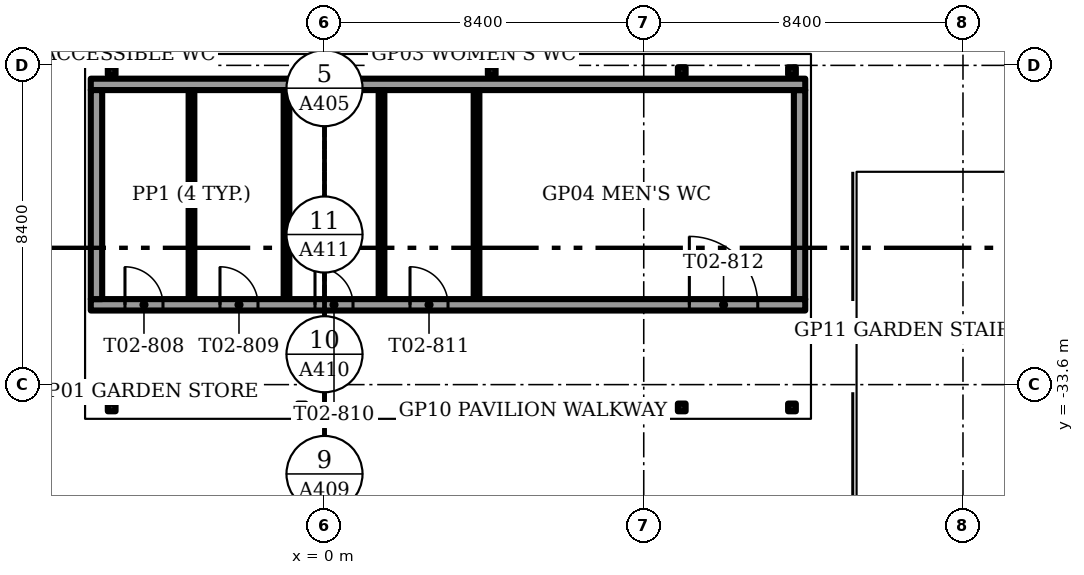
"""IFC4 building model, lengths in metres.
Left out: names, types, materials, properties, quantities, classifications, styles, units other than length and angle.
Written with IfcOpenShell. Run it as: python <this file> out.ifc"""

import sys

from ifc_helpers import new_model, si_unit, direction, frame, frame_2d, origin, origin_2d, place, context, subcontext, project, spatial, rectangle, hollow_rectangle, extrude, element, fill, save


model = new_model("IFC4")
c1 = context("Model", 3, precision=1e-05, world=origin(), true_north=direction((0.0, 1.0)))
c2 = subcontext(c1, "Body", "Model", "MODEL_VIEW")
j1 = project(units=[si_unit("LENGTHUNIT", "METRE"), si_unit("PLANEANGLEUNIT", "RADIAN")], contexts=[c1])
p1 = place(None, origin())
s1 = spatial("IfcSite", under=j1, at=p1, CompositionType="ELEMENT")
p2 = place(p1, origin())
s2 = spatial("IfcBuilding", under=s1, at=p2, CompositionType="ELEMENT")
p3 = place(p2, frame((0.0, 0.0, 10.0)))
s3 = spatial("IfcBuildingStorey", under=s2, at=p3, CompositionType="ELEMENT", Elevation=10.0)
for number, where, z_axis, x_axis in (
    (1, (-5.6, -34.2, 0.3), (0.0, 0.0, 1.0), (1.0, 0.0, 0.0)),
    (2, (-0.6, -34.2, 0.3), (0.0, 0.0, 1.0), (1.0, 0.0, 0.0)),
    (3, (4.4, -34.2, 0.3), (0.0, 0.0, 1.0), (1.0, 0.0, 0.0)),
    (4, (9.4, -34.2, 0.3), (0.0, 0.0, 1.0), (1.0, 0.0, 0.0)),
    (5, (12.3, -34.2, 0.3), (0.0, 0.0, 1.0), (1.0, 0.0, 0.0)),
    (6, (-5.6, -25.35, 0.3), (0.0, 0.0, 1.0), (1.0, 0.0, 0.0)),
    (7, (-0.6, -25.35, 0.3), (0.0, 0.0, 1.0), (1.0, 0.0, 0.0)),
    (8, (4.4, -25.35, 0.3), (0.0, 0.0, 1.0), (1.0, 0.0, 0.0)),
    (9, (9.4, -25.35, 0.3), (0.0, 0.0, 1.0), (1.0, 0.0, 0.0)),
    (10, (12.3, -25.35, 0.3), (0.0, 0.0, 1.0), (1.0, 0.0, 0.0)),
):
    element("IfcColumn", number, at=place(p3, frame(where, z_axis=z_axis, x_axis=x_axis)), inside=s3, PredefinedType="COLUMN", context=c2, shape_type="SweptSolid", body=[
        extrude(hollow_rectangle(XDim=0.203, YDim=0.203, WallThickness=0.012, at=origin_2d()), origin(), (0.0, 0.0, 1.0), 3.05),
    ])
p4 = place(p3, frame((-6.15, -31.5, 0.0), z_axis=(0.0, 0.0, 1.0), x_axis=(1.0, 0.0, 0.0)))
e11 = element("IfcWall", 11, at=p4, inside=s3, PredefinedType="SOLIDWALL", context=c2, shape_type="SweptSolid", body=[
    extrude(rectangle(XDim=18.8, YDim=0.3, at=frame_2d((9.4, 0.0))), origin(), (0.0, 0.0, 1.0), 3.35),
])
p5 = place(p4, frame((0.9, 0.0, 0.0)))
e12 = element("IfcOpeningElement", 12, at=p5, cuts=e11, PredefinedType="OPENING", context=c2, shape_type="SweptSolid", body=[
    extrude(rectangle(XDim=1.0, YDim=2.1, at=frame_2d((0.5, 1.05))), frame((0.0, 0.15, 0.0), z_axis=(0.0, -1.0, 0.0), x_axis=(1.0, 0.0, 0.0)), (0.0, 0.0, 1.0), 0.3),
])
p6 = place(p4, frame((3.4, 0.0, 0.0)))
e13 = element("IfcOpeningElement", 13, at=p6, cuts=e11, PredefinedType="OPENING", context=c2, shape_type="SweptSolid", body=[
    extrude(rectangle(XDim=1.0, YDim=2.1, at=frame_2d((0.5, 1.05))), frame((0.0, 0.15, 0.0), z_axis=(0.0, -1.0, 0.0), x_axis=(1.0, 0.0, 0.0)), (0.0, 0.0, 1.0), 0.3),
])
p7 = place(p4, frame((5.9, 0.0, 0.0)))
e14 = element("IfcOpeningElement", 14, at=p7, cuts=e11, PredefinedType="OPENING", context=c2, shape_type="SweptSolid", body=[
    extrude(rectangle(XDim=1.0, YDim=2.1, at=frame_2d((0.5, 1.05))), frame((0.0, 0.15, 0.0), z_axis=(0.0, -1.0, 0.0), x_axis=(1.0, 0.0, 0.0)), (0.0, 0.0, 1.0), 0.3),
])
p8 = place(p4, frame((8.4, 0.0, 0.0)))
e15 = element("IfcOpeningElement", 15, at=p8, cuts=e11, PredefinedType="OPENING", context=c2, shape_type="SweptSolid", body=[
    extrude(rectangle(XDim=1.0, YDim=2.1, at=frame_2d((0.5, 1.05))), frame((0.0, 0.15, 0.0), z_axis=(0.0, -1.0, 0.0), x_axis=(1.0, 0.0, 0.0)), (0.0, 0.0, 1.0), 0.3),
])
p9 = place(p4, frame((15.75, 0.0, 0.0)))
e16 = element("IfcOpeningElement", 16, at=p9, cuts=e11, PredefinedType="OPENING", context=c2, shape_type="SweptSolid", body=[
    extrude(rectangle(XDim=1.8, YDim=2.4, at=frame_2d((0.9, 1.2))), frame((0.0, 0.15, 0.0), z_axis=(0.0, -1.0, 0.0), x_axis=(1.0, 0.0, 0.0)), (0.0, 0.0, 1.0), 0.3),
])
p10 = place(p3, frame((-6.15, -25.7, 0.0), z_axis=(0.0, 0.0, 1.0), x_axis=(1.0, 0.0, 0.0)))
e17 = element("IfcWall", 17, at=p10, inside=s3, PredefinedType="SOLIDWALL", context=c2, shape_type="SweptSolid", body=[
    extrude(rectangle(XDim=18.8, YDim=0.3, at=frame_2d((9.4, 0.0))), origin(), (0.0, 0.0, 1.0), 3.35),
])
for number, where, z_axis, x_axis in (
    (18, (-6.0, -31.35, 0.0), (0.0, 0.0, 1.0), (0.0, 1.0, 0.0)),
    (19, (12.5, -31.35, 0.0), (0.0, 0.0, 1.0), (0.0, 1.0, 0.0)),
):
    element("IfcWall", number, at=place(p3, frame(where, z_axis=z_axis, x_axis=x_axis)), inside=s3, PredefinedType="SOLIDWALL", context=c2, shape_type="SweptSolid", body=[
        extrude(rectangle(XDim=5.5, YDim=0.3, at=frame_2d((2.75, 0.0))), origin(), (0.0, 0.0, 1.0), 3.35),
    ])
for number, where, z_axis, x_axis in (
    (20, (-3.5, -31.35, 0.0), (0.0, 0.0, 1.0), (0.0, 1.0, 0.0)),
    (21, (-1.0, -31.35, 0.0), (0.0, 0.0, 1.0), (0.0, 1.0, 0.0)),
    (22, (1.5, -31.35, 0.0), (0.0, 0.0, 1.0), (0.0, 1.0, 0.0)),
    (23, (4.0, -31.35, 0.0), (0.0, 0.0, 1.0), (0.0, 1.0, 0.0)),
):
    element("IfcWall", number, at=place(p3, frame(where, z_axis=z_axis, x_axis=x_axis)), inside=s3, PredefinedType="SOLIDWALL", context=c2, shape_type="SweptSolid", body=[
        extrude(rectangle(XDim=5.5, YDim=0.15, at=frame_2d((2.75, 0.0))), origin(), (0.0, 0.0, 1.0), 3.35),
    ])
p11 = place(p5, origin())
e24 = element("IfcDoor", 24, at=p11, inside=s3, OperationType="SINGLE_SWING_LEFT", PredefinedType="DOOR", context=c2, shape_type="SweptSolid", body=[
    extrude(rectangle(XDim=1.0, YDim=2.1, at=frame_2d((0.5, 1.05))), frame((0.0, 0.025, 0.0), z_axis=(0.0, -1.0, 0.0), x_axis=(1.0, 0.0, 0.0)), (0.0, 0.0, 1.0), 0.05),
])
fill(e12, e24)
p12 = place(p6, origin())
e25 = element("IfcDoor", 25, at=p12, inside=s3, OperationType="SINGLE_SWING_LEFT", PredefinedType="DOOR", context=c2, shape_type="SweptSolid", body=[
    extrude(rectangle(XDim=1.0, YDim=2.1, at=frame_2d((0.5, 1.05))), frame((0.0, 0.025, 0.0), z_axis=(0.0, -1.0, 0.0), x_axis=(1.0, 0.0, 0.0)), (0.0, 0.0, 1.0), 0.05),
])
fill(e13, e25)
p13 = place(p7, origin())
e26 = element("IfcDoor", 26, at=p13, inside=s3, OperationType="SINGLE_SWING_LEFT", PredefinedType="DOOR", context=c2, shape_type="SweptSolid", body=[
    extrude(rectangle(XDim=1.0, YDim=2.1, at=frame_2d((0.5, 1.05))), frame((0.0, 0.025, 0.0), z_axis=(0.0, -1.0, 0.0), x_axis=(1.0, 0.0, 0.0)), (0.0, 0.0, 1.0), 0.05),
])
fill(e14, e26)
p14 = place(p8, origin())
e27 = element("IfcDoor", 27, at=p14, inside=s3, OperationType="SINGLE_SWING_LEFT", PredefinedType="DOOR", context=c2, shape_type="SweptSolid", body=[
    extrude(rectangle(XDim=1.0, YDim=2.1, at=frame_2d((0.5, 1.05))), frame((0.0, 0.025, 0.0), z_axis=(0.0, -1.0, 0.0), x_axis=(1.0, 0.0, 0.0)), (0.0, 0.0, 1.0), 0.05),
])
fill(e15, e27)
p15 = place(p9, origin())
e28 = element("IfcDoor", 28, at=p15, inside=s3, OperationType="DOUBLE_DOOR_SINGLE_SWING", PredefinedType="DOOR", context=c2, shape_type="SweptSolid", body=[
    extrude(rectangle(XDim=1.8, YDim=2.4, at=frame_2d((0.9, 1.2))), frame((0.0, 0.025, 0.0), z_axis=(0.0, -1.0, 0.0), x_axis=(1.0, 0.0, 0.0)), (0.0, 0.0, 1.0), 0.05),
])
fill(e16, e28)
save(model, sys.argv[1])
